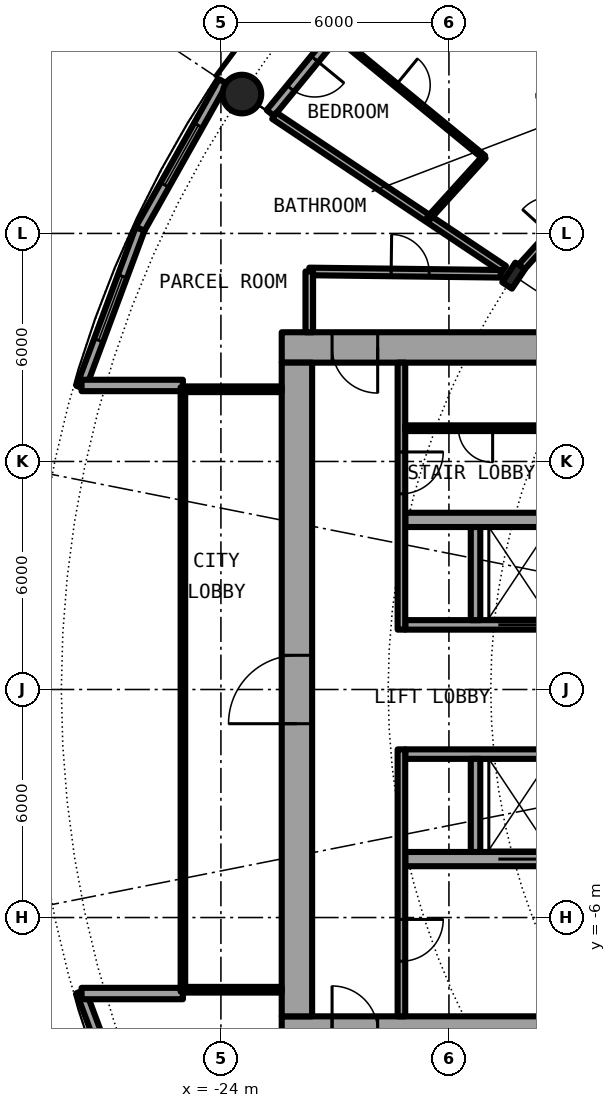
"""IFC4 building model, lengths in metres.
Left out: names, types, materials, properties, quantities, classifications, styles, units other than length and angle.
Written with IfcOpenShell. Run it as: python <this file> out.ifc"""

import sys

from ifc_helpers import new_model, si_unit, direction, frame, frame_2d, origin, origin_2d, place, context, subcontext, project, spatial, rectangle, hollow_circle, i_section, extrude, element, fill, save


model = new_model("IFC4")
c1 = context("Model", 3, precision=1e-05, world=origin(), true_north=direction((0.0, 1.0)))
c2 = subcontext(c1, "Body", "Model", "MODEL_VIEW")
j1 = project(units=[si_unit("LENGTHUNIT", "METRE"), si_unit("PLANEANGLEUNIT", "RADIAN")], contexts=[c1])
p1 = place(None, origin())
s1 = spatial("IfcSite", under=j1, at=p1, CompositionType="ELEMENT")
p2 = place(p1, origin())
s2 = spatial("IfcBuilding", under=s1, at=p2, CompositionType="ELEMENT")
p3 = place(p2, frame((0.0, 0.0, 28.9)))
s3 = spatial("IfcBuildingStorey", under=s2, at=p3, CompositionType="ELEMENT", Elevation=28.9)
p4 = place(p3, frame((-23.448, 15.667, 0.0), z_axis=(0.0, 0.0, 1.0), x_axis=(1.0, 0.0, 0.0)))
e1 = element("IfcColumn", 1, at=p4, inside=s3, PredefinedType="COLUMN", context=c2, shape_type="SweptSolid", body=[
    extrude(hollow_circle(Radius=0.508, WallThickness=0.05, at=origin_2d()), origin(), (0.0, 0.0, 1.0), 3.05),
])
p5 = place(p3, frame((-16.297, 10.889, 0.0), z_axis=(0.0, 0.0, 1.0), x_axis=(-0.831469612303, 0.55557023302, 0.0)))
e2 = element("IfcColumn", 2, at=p5, inside=s3, PredefinedType="COLUMN", context=c2, shape_type="SweptSolid", body=[
    extrude(i_section(OverallWidth=0.305, OverallDepth=0.62, WebThickness=0.021, FlangeThickness=0.04, FilletRadius=0.027, at=origin_2d()), origin(), (0.0, 0.0, 1.0), 3.05),
])
p6 = place(p3, frame((-19.304, 19.304, 0.0), z_axis=(0.0, 0.0, 1.0), x_axis=(-0.634382322723, -0.773019449054, 0.0)))
e3 = element("IfcWall", 3, at=p6, inside=s3, PredefinedType="SOLIDWALL", context=c2, shape_type="SweptSolid", body=[
    extrude(rectangle(XDim=5.352, YDim=0.25, at=frame_2d((2.676, 0.0))), origin(), (0.0, 0.0, 1.0), 2.7),
])
p7 = place(p6, frame((0.441, 0.0, 0.3)))
e4 = element("IfcOpeningElement", 4, at=p7, cuts=e3, PredefinedType="OPENING", context=c2, shape_type="SweptSolid", body=[
    extrude(rectangle(XDim=1.8, YDim=2.1, at=frame_2d((0.9, 1.05))), frame((0.0, 0.135, 0.0), z_axis=(0.0, -1.0, 0.0), x_axis=(1.0, 0.0, 0.0)), (0.0, 0.0, 1.0), 0.27),
])
p8 = place(p6, frame((3.51, 0.0, 0.0)))
e5 = element("IfcOpeningElement", 5, at=p8, cuts=e3, PredefinedType="OPENING", context=c2, shape_type="SweptSolid", body=[
    extrude(rectangle(XDim=1.0, YDim=2.2, at=frame_2d((0.5, 1.1))), frame((0.0, 0.135, 0.0), z_axis=(0.0, -1.0, 0.0), x_axis=(1.0, 0.0, 0.0)), (0.0, 0.0, 1.0), 0.27),
])
p9 = place(p3, frame((-27.682, -7.945, 0.0), z_axis=(0.0, 0.0, 1.0), x_axis=(0.349247811493, -0.937030397675, 0.0)))
e6 = element("IfcWall", 6, at=p9, inside=s3, PredefinedType="SOLIDWALL", context=c2, shape_type="SweptSolid", body=[
    extrude(rectangle(XDim=4.452, YDim=0.25, at=frame_2d((2.226, 0.0))), origin(), (0.0, 0.0, 1.0), 2.7),
])
p10 = place(p9, frame((1.327, 0.0, 0.3)))
e7 = element("IfcOpeningElement", 7, at=p10, cuts=e6, PredefinedType="OPENING", context=c2, shape_type="SweptSolid", body=[
    extrude(rectangle(XDim=1.8, YDim=2.1, at=frame_2d((0.9, 1.05))), frame((0.0, 0.135, 0.0), z_axis=(0.0, -1.0, 0.0), x_axis=(1.0, 0.0, 0.0)), (0.0, 0.0, 1.0), 0.27),
])
p11 = place(p3, frame((-23.946, 16.0, 0.0), z_axis=(0.0, 0.0, 1.0), x_axis=(-0.489696356642, -0.871893042919, 0.0)))
e8 = element("IfcWall", 8, at=p11, inside=s3, PredefinedType="SOLIDWALL", context=c2, shape_type="SweptSolid", body=[
    extrude(rectangle(XDim=4.454, YDim=0.25, at=frame_2d((2.227, 0.0))), origin(), (0.0, 0.0, 1.0), 2.7),
])
p12 = place(p11, frame((1.327, 0.0, 0.3)))
e9 = element("IfcOpeningElement", 9, at=p12, cuts=e8, PredefinedType="OPENING", context=c2, shape_type="SweptSolid", body=[
    extrude(rectangle(XDim=1.8, YDim=2.1, at=frame_2d((0.9, 1.05))), frame((0.0, 0.135, 0.0), z_axis=(0.0, -1.0, 0.0), x_axis=(1.0, 0.0, 0.0)), (0.0, 0.0, 1.0), 0.27),
])
p13 = place(p3, frame((-26.127, 12.117, 0.0), z_axis=(0.0, 0.0, 1.0), x_axis=(-0.349247811493, -0.937030397675, 0.0)))
e10 = element("IfcWall", 10, at=p13, inside=s3, PredefinedType="SOLIDWALL", context=c2, shape_type="SweptSolid", body=[
    extrude(rectangle(XDim=4.452, YDim=0.25, at=frame_2d((2.226, 0.0))), origin(), (0.0, 0.0, 1.0), 2.7),
])
p14 = place(p13, frame((1.327, 0.0, 0.3)))
e11 = element("IfcOpeningElement", 11, at=p14, cuts=e10, PredefinedType="OPENING", context=c2, shape_type="SweptSolid", body=[
    extrude(rectangle(XDim=1.8, YDim=2.1, at=frame_2d((0.9, 1.05))), frame((0.0, 0.135, 0.0), z_axis=(0.0, -1.0, 0.0), x_axis=(1.0, 0.0, 0.0)), (0.0, 0.0, 1.0), 0.27),
])
for number, where, z_axis, x_axis in (
    (12, (-25.0, 8.0, 0.0), (0.0, 0.0, 1.0), (-1.0, 0.0, 0.0)),
    (13, (-25.0, -8.0, 0.0), (0.0, 0.0, 1.0), (-1.0, 0.0, 0.0)),
):
    element("IfcWall", number, at=place(p3, frame(where, z_axis=z_axis, x_axis=x_axis)), inside=s3, PredefinedType="SOLIDWALL", context=c2, shape_type="SweptSolid", body=[
        extrude(rectangle(XDim=2.667, YDim=0.3, at=frame_2d((1.333, 0.0))), origin(), (0.0, 0.0, 1.0), 2.7),
    ])
p15 = place(p3, frame((-22.4, -9.0, 0.0), z_axis=(0.0, 0.0, 1.0), x_axis=(1.0, 0.0, 0.0)))
e14 = element("IfcWall", 14, at=p15, inside=s3, PredefinedType="SHEAR", context=c2, shape_type="SweptSolid", body=[
    extrude(rectangle(XDim=14.2, YDim=0.8, at=frame_2d((7.1, 0.0))), origin(), (0.0, 0.0, 1.0), 3.05),
])
p16 = place(p15, frame((1.325, 0.0, 0.0)))
e15 = element("IfcOpeningElement", 15, at=p16, cuts=e14, PredefinedType="OPENING", context=c2, shape_type="SweptSolid", body=[
    extrude(rectangle(XDim=1.2, YDim=2.3, at=frame_2d((0.6, 1.15))), frame((0.0, 0.41, 0.0), z_axis=(0.0, -1.0, 0.0), x_axis=(1.0, 0.0, 0.0)), (0.0, 0.0, 1.0), 0.82),
])
p17 = place(p3, frame((-8.2, 9.0, 0.0), z_axis=(0.0, 0.0, 1.0), x_axis=(-1.0, 0.0, 0.0)))
e16 = element("IfcWall", 16, at=p17, inside=s3, PredefinedType="SHEAR", context=c2, shape_type="SweptSolid", body=[
    extrude(rectangle(XDim=14.2, YDim=0.8, at=frame_2d((7.1, 0.0))), origin(), (0.0, 0.0, 1.0), 3.05),
])
p18 = place(p17, frame((11.675, 0.0, 0.0)))
e17 = element("IfcOpeningElement", 17, at=p18, cuts=e16, PredefinedType="OPENING", context=c2, shape_type="SweptSolid", body=[
    extrude(rectangle(XDim=1.2, YDim=2.3, at=frame_2d((0.6, 1.15))), frame((0.0, 0.41, 0.0), z_axis=(0.0, -1.0, 0.0), x_axis=(1.0, 0.0, 0.0)), (0.0, 0.0, 1.0), 0.82),
])
p19 = place(p3, frame((-22.0, -8.6, 0.0), z_axis=(0.0, 0.0, 1.0), x_axis=(0.0, 1.0, 0.0)))
e18 = element("IfcWall", 18, at=p19, inside=s3, PredefinedType="SHEAR", context=c2, shape_type="SweptSolid", body=[
    extrude(rectangle(XDim=17.2, YDim=0.8, at=frame_2d((8.6, 0.0))), origin(), (0.0, 0.0, 1.0), 3.05),
])
p20 = place(p19, frame((7.7, 0.0, 0.0)))
e19 = element("IfcOpeningElement", 19, at=p20, cuts=e18, PredefinedType="OPENING", context=c2, shape_type="SweptSolid", body=[
    extrude(rectangle(XDim=1.8, YDim=2.3, at=frame_2d((0.9, 1.15))), frame((0.0, 0.41, 0.0), z_axis=(0.0, -1.0, 0.0), x_axis=(1.0, 0.0, 0.0)), (0.0, 0.0, 1.0), 0.82),
])
p21 = place(p3, frame((-9.0, -1.7, 0.0), z_axis=(0.0, 0.0, 1.0), x_axis=(-1.0, 0.0, 0.0)))
e20 = element("IfcWall", 20, at=p21, inside=s3, PredefinedType="SHEAR", context=c2, shape_type="SweptSolid", body=[
    extrude(rectangle(XDim=10.15, YDim=0.25, at=frame_2d((5.075, 0.0))), origin(), (0.0, 0.0, 1.0), 3.05),
])
p22 = place(p21, frame((0.387, 0.0, 0.0)))
e21 = element("IfcOpeningElement", 21, at=p22, cuts=e20, PredefinedType="OPENING", context=c2, shape_type="SweptSolid", body=[
    extrude(rectangle(XDim=1.1, YDim=2.3, at=frame_2d((0.55, 1.15))), frame((0.0, 0.135, 0.0), z_axis=(0.0, -1.0, 0.0), x_axis=(1.0, 0.0, 0.0)), (0.0, 0.0, 1.0), 0.27),
])
p23 = place(p21, frame((2.45, 0.0, 0.0)))
e22 = element("IfcOpeningElement", 22, at=p23, cuts=e20, PredefinedType="OPENING", context=c2, shape_type="SweptSolid", body=[
    extrude(rectangle(XDim=1.1, YDim=2.3, at=frame_2d((0.55, 1.15))), frame((0.0, 0.135, 0.0), z_axis=(0.0, -1.0, 0.0), x_axis=(1.0, 0.0, 0.0)), (0.0, 0.0, 1.0), 0.27),
])
p24 = place(p21, frame((4.45, 0.0, 0.0)))
e23 = element("IfcOpeningElement", 23, at=p24, cuts=e20, PredefinedType="OPENING", context=c2, shape_type="SweptSolid", body=[
    extrude(rectangle(XDim=1.1, YDim=2.3, at=frame_2d((0.55, 1.15))), frame((0.0, 0.135, 0.0), z_axis=(0.0, -1.0, 0.0), x_axis=(1.0, 0.0, 0.0)), (0.0, 0.0, 1.0), 0.27),
])
p25 = place(p3, frame((-9.0, -4.462, 0.0), z_axis=(0.0, 0.0, 1.0), x_axis=(-1.0, 0.0, 0.0)))
e24 = element("IfcWall", 24, at=p25, inside=s3, PredefinedType="SHEAR", context=c2, shape_type="SweptSolid", body=[
    extrude(rectangle(XDim=10.15, YDim=0.375, at=frame_2d((5.075, 0.0))), origin(), (0.0, 0.0, 1.0), 3.05),
])
p26 = place(p25, frame((6.6, 0.0, 0.0)))
e25 = element("IfcOpeningElement", 25, at=p26, cuts=e24, PredefinedType="OPENING", context=c2, shape_type="SweptSolid", body=[
    extrude(rectangle(XDim=1.1, YDim=2.3, at=frame_2d((0.55, 1.15))), frame((0.0, 0.198, 0.0), z_axis=(0.0, -1.0, 0.0), x_axis=(1.0, 0.0, 0.0)), (0.0, 0.0, 1.0), 0.395),
])
p27 = place(p3, frame((-17.3, -1.825, 0.0), z_axis=(0.0, 0.0, 1.0), x_axis=(0.0, -1.0, 0.0)))
e26 = element("IfcWall", 26, at=p27, inside=s3, PredefinedType="SOLIDWALL", context=c2, shape_type="SweptSolid", body=[
    extrude(rectangle(XDim=2.45, YDim=0.25, at=frame_2d((1.225, 0.0))), origin(), (0.0, 0.0, 1.0), 2.7),
])
p28 = place(p3, frame((-19.25, -1.575, 0.0), z_axis=(0.0, 0.0, 1.0), x_axis=(0.0, -1.0, 0.0)))
e27 = element("IfcWall", 27, at=p28, inside=s3, PredefinedType="SOLIDWALL", context=c2, shape_type="SweptSolid", body=[
    extrude(rectangle(XDim=7.025, YDim=0.2, at=frame_2d((3.513, 0.0))), origin(), (0.0, 0.0, 1.0), 2.7),
])
p29 = place(p28, frame((4.475, 0.0, 0.0)))
e28 = element("IfcOpeningElement", 28, at=p29, cuts=e27, PredefinedType="OPENING", context=c2, shape_type="SweptSolid", body=[
    extrude(rectangle(XDim=1.1, YDim=2.3, at=frame_2d((0.55, 1.15))), frame((0.0, 0.11, 0.0), z_axis=(0.0, -1.0, 0.0), x_axis=(1.0, 0.0, 0.0)), (0.0, 0.0, 1.0), 0.22),
])
p30 = place(p3, frame((-19.15, 1.7, 0.0), z_axis=(0.0, 0.0, 1.0), x_axis=(1.0, 0.0, 0.0)))
e29 = element("IfcWall", 29, at=p30, inside=s3, PredefinedType="SHEAR", context=c2, shape_type="SweptSolid", body=[
    extrude(rectangle(XDim=10.15, YDim=0.25, at=frame_2d((5.075, 0.0))), origin(), (0.0, 0.0, 1.0), 3.05),
])
p31 = place(p30, frame((2.45, 0.0, 0.0)))
e30 = element("IfcOpeningElement", 30, at=p31, cuts=e29, PredefinedType="OPENING", context=c2, shape_type="SweptSolid", body=[
    extrude(rectangle(XDim=1.1, YDim=2.3, at=frame_2d((0.55, 1.15))), frame((0.0, 0.135, 0.0), z_axis=(0.0, -1.0, 0.0), x_axis=(1.0, 0.0, 0.0)), (0.0, 0.0, 1.0), 0.27),
])
p32 = place(p30, frame((8.087, 0.0, 0.0)))
e31 = element("IfcOpeningElement", 31, at=p32, cuts=e29, PredefinedType="OPENING", context=c2, shape_type="SweptSolid", body=[
    extrude(rectangle(XDim=0.9, YDim=2.3, at=frame_2d((0.45, 1.15))), frame((0.0, 0.135, 0.0), z_axis=(0.0, -1.0, 0.0), x_axis=(1.0, 0.0, 0.0)), (0.0, 0.0, 1.0), 0.27),
])
p33 = place(p30, frame((5.075, 0.0, 0.0)))
e32 = element("IfcOpeningElement", 32, at=p33, cuts=e29, PredefinedType="OPENING", context=c2, shape_type="SweptSolid", body=[
    extrude(rectangle(XDim=0.9, YDim=2.3, at=frame_2d((0.45, 1.15))), frame((0.0, 0.135, 0.0), z_axis=(0.0, -1.0, 0.0), x_axis=(1.0, 0.0, 0.0)), (0.0, 0.0, 1.0), 0.27),
])
p34 = place(p3, frame((-9.0, 4.462, 0.0), z_axis=(0.0, 0.0, 1.0), x_axis=(-1.0, 0.0, 0.0)))
e33 = element("IfcWall", 33, at=p34, inside=s3, PredefinedType="SHEAR", context=c2, shape_type="SweptSolid", body=[
    extrude(rectangle(XDim=10.15, YDim=0.375, at=frame_2d((5.075, 0.0))), origin(), (0.0, 0.0, 1.0), 3.05),
])
p35 = place(p3, frame((-17.3, 1.825, 0.0), z_axis=(0.0, 0.0, 1.0), x_axis=(0.0, 1.0, 0.0)))
e34 = element("IfcWall", 34, at=p35, inside=s3, PredefinedType="SOLIDWALL", context=c2, shape_type="SweptSolid", body=[
    extrude(rectangle(XDim=2.45, YDim=0.25, at=frame_2d((1.225, 0.0))), origin(), (0.0, 0.0, 1.0), 2.7),
])
p36 = place(p3, frame((-19.25, 8.6, 0.0), z_axis=(0.0, 0.0, 1.0), x_axis=(0.0, -1.0, 0.0)))
e35 = element("IfcWall", 35, at=p36, inside=s3, PredefinedType="SOLIDWALL", context=c2, shape_type="SweptSolid", body=[
    extrude(rectangle(XDim=7.025, YDim=0.2, at=frame_2d((3.513, 0.0))), origin(), (0.0, 0.0, 1.0), 2.7),
])
p37 = place(p36, frame((2.35, 0.0, 0.0)))
e36 = element("IfcOpeningElement", 36, at=p37, cuts=e35, PredefinedType="OPENING", context=c2, shape_type="SweptSolid", body=[
    extrude(rectangle(XDim=1.1, YDim=2.3, at=frame_2d((0.55, 1.15))), frame((0.0, 0.11, 0.0), z_axis=(0.0, -1.0, 0.0), x_axis=(1.0, 0.0, 0.0)), (0.0, 0.0, 1.0), 0.22),
])
p38 = place(p3, frame((-15.45, 6.875, 0.0), z_axis=(0.0, 0.0, 1.0), x_axis=(-1.0, 0.0, 0.0)))
e37 = element("IfcWall", 37, at=p38, inside=s3, PredefinedType="PARTITIONING", context=c2, shape_type="SweptSolid", body=[
    extrude(rectangle(XDim=3.7, YDim=0.15, at=frame_2d((1.85, 0.0))), origin(), (0.0, 0.0, 1.0), 2.7),
])
p39 = place(p38, frame((1.4, 0.0, 0.0)))
e38 = element("IfcOpeningElement", 38, at=p39, cuts=e37, PredefinedType="OPENING", context=c2, shape_type="SweptSolid", body=[
    extrude(rectangle(XDim=0.9, YDim=2.3, at=frame_2d((0.45, 1.15))), frame((0.0, 0.085, 0.0), z_axis=(0.0, -1.0, 0.0), x_axis=(1.0, 0.0, 0.0)), (0.0, 0.0, 1.0), 0.17),
])
for number, where, z_axis, x_axis in (
    (39, (-22.4, 7.9, 0.0), (0.0, 0.0, 1.0), (-1.0, 0.0, 0.0)),
    (40, (-22.4, -7.9, 0.0), (0.0, 0.0, 1.0), (-1.0, 0.0, 0.0)),
):
    element("IfcWall", number, at=place(p3, frame(where, z_axis=z_axis, x_axis=x_axis)), inside=s3, PredefinedType="PARTITIONING", context=c2, shape_type="SweptSolid", body=[
        extrude(rectangle(XDim=2.54, YDim=0.15, at=frame_2d((1.27, 0.0))), origin(), (0.0, 0.0, 1.0), 2.7),
    ])
p40 = place(p3, frame((-25.0, 7.95, 0.0), z_axis=(0.0, 0.0, 1.0), x_axis=(0.0, -1.0, 0.0)))
e41 = element("IfcWall", 41, at=p40, inside=s3, PredefinedType="PARTITIONING", context=c2, shape_type="SweptSolid", body=[
    extrude(rectangle(XDim=15.9, YDim=0.12, at=frame_2d((7.95, 0.0))), origin(), (0.0, 0.0, 1.0), 2.7),
])
p41 = place(p40, frame((0.95, 0.0, 0.1)))
e42 = element("IfcOpeningElement", 42, at=p41, cuts=e41, PredefinedType="OPENING", context=c2, shape_type="SweptSolid", body=[
    extrude(rectangle(XDim=14.0, YDim=2.35, at=frame_2d((7.0, 1.175))), frame((0.0, 0.07, 0.0), z_axis=(0.0, -1.0, 0.0), x_axis=(1.0, 0.0, 0.0)), (0.0, 0.0, 1.0), 0.14),
])
p42 = place(p3, frame((-22.595, 15.097, 0.0), z_axis=(0.0, 0.0, 1.0), x_axis=(0.831465568067, -0.555576285599, 0.0)))
e43 = element("IfcWall", 43, at=p42, inside=s3, PredefinedType="PARTITIONING", context=c2, shape_type="SweptSolid", body=[
    extrude(rectangle(XDim=7.264, YDim=0.2, at=frame_2d((3.632, 0.0))), origin(), (0.0, 0.0, 1.0), 2.7),
])
p43 = place(p3, frame((-21.012, 17.233, 0.0), z_axis=(0.0, 0.0, 1.0), x_axis=(0.77326214499, -0.634086472908, 0.0)))
e44 = element("IfcWall", 44, at=p43, inside=s3, PredefinedType="PARTITIONING", context=c2, shape_type="SweptSolid", body=[
    extrude(rectangle(XDim=5.089, YDim=0.1, at=frame_2d((2.544, 0.0))), origin(), (0.0, 0.0, 1.0), 2.7),
])
p44 = place(p43, frame((2.094, 0.0, 0.0)))
e45 = element("IfcOpeningElement", 45, at=p44, cuts=e44, PredefinedType="OPENING", context=c2, shape_type="SweptSolid", body=[
    extrude(rectangle(XDim=0.9, YDim=2.3, at=frame_2d((0.45, 1.15))), frame((0.0, 0.06, 0.0), z_axis=(0.0, -1.0, 0.0), x_axis=(1.0, 0.0, 0.0)), (0.0, 0.0, 1.0), 0.12),
])
p45 = place(p3, frame((-17.24, 21.007, 0.0), z_axis=(0.0, 0.0, 1.0), x_axis=(0.634381303318, -0.773020285633, 0.0)))
e46 = element("IfcWall", 46, at=p45, inside=s3, PredefinedType="PARTITIONING", context=c2, shape_type="SweptSolid", body=[
    extrude(rectangle(XDim=7.576, YDim=0.2, at=frame_2d((3.788, 0.0))), origin(), (0.0, 0.0, 1.0), 2.7),
])
p46 = place(p3, frame((-21.675, 11.0, 0.0), z_axis=(0.0, 0.0, 1.0), x_axis=(0.99992425795, -0.012307654658, 0.0)))
e47 = element("IfcWall", 47, at=p46, inside=s3, PredefinedType="PARTITIONING", context=c2, shape_type="SweptSolid", body=[
    extrude(rectangle(XDim=5.039, YDim=0.2, at=frame_2d((2.519, 0.0))), origin(), (0.0, 0.0, 1.0), 2.7),
])
p47 = place(p46, frame((2.155, 0.0, 0.0)))
e48 = element("IfcOpeningElement", 48, at=p47, cuts=e47, PredefinedType="OPENING", context=c2, shape_type="SweptSolid", body=[
    extrude(rectangle(XDim=1.0, YDim=2.3, at=frame_2d((0.5, 1.15))), frame((0.0, 0.11, 0.0), z_axis=(0.0, -1.0, 0.0), x_axis=(1.0, 0.0, 0.0)), (0.0, 0.0, 1.0), 0.22),
])
p48 = place(p3, frame((-16.193, 11.003, 0.0), z_axis=(0.0, 0.0, 1.0), x_axis=(0.671514934772, 0.740991020444, 0.0)))
e49 = element("IfcWall", 49, at=p48, inside=s3, PredefinedType="PARTITIONING", context=c2, shape_type="SweptSolid", body=[
    extrude(rectangle(XDim=5.598, YDim=0.2, at=frame_2d((2.799, 0.0))), origin(), (0.0, 0.0, 1.0), 2.38),
])
p49 = place(p48, frame((1.293, 0.0, 0.0)))
e50 = element("IfcOpeningElement", 50, at=p49, cuts=e49, PredefinedType="OPENING", context=c2, shape_type="SweptSolid", body=[
    extrude(rectangle(XDim=1.0, YDim=2.3, at=frame_2d((0.5, 1.15))), frame((0.0, 0.11, 0.0), z_axis=(0.0, -1.0, 0.0), x_axis=(1.0, 0.0, 0.0)), (0.0, 0.0, 1.0), 0.22),
])
p50 = place(p3, frame((-21.675, 9.4, 0.0), z_axis=(0.0, 0.0, 1.0), x_axis=(0.0, 1.0, 0.0)))
e51 = element("IfcWall", 51, at=p50, inside=s3, PredefinedType="PARTITIONING", context=c2, shape_type="SweptSolid", body=[
    extrude(rectangle(XDim=1.6, YDim=0.2, at=frame_2d((0.8, 0.0))), origin(), (0.0, 0.0, 1.0), 2.7),
])
p51 = place(p3, frame((-18.538, 12.394, 0.0), z_axis=(0.0, 0.0, 1.0), x_axis=(0.67169789574, 0.740825172937, 0.0)))
e52 = element("IfcWall", 52, at=p51, inside=s3, PredefinedType="PARTITIONING", context=c2, shape_type="SweptSolid", body=[
    extrude(rectangle(XDim=2.183, YDim=0.1, at=frame_2d((1.091, 0.0))), origin(), (0.0, 0.0, 1.0), 2.7),
])
p52 = place(p8, origin())
e53 = element("IfcDoor", 53, at=p52, inside=s3, OperationType="SINGLE_SWING_LEFT", PredefinedType="DOOR", context=c2, shape_type="SweptSolid", body=[
    extrude(rectangle(XDim=1.0, YDim=2.2, at=frame_2d((0.5, 1.1))), frame((0.0, 0.025, 0.0), z_axis=(0.0, -1.0, 0.0), x_axis=(1.0, 0.0, 0.0)), (0.0, 0.0, 1.0), 0.05),
])
fill(e5, e53)
p53 = place(p12, origin())
e54 = element("IfcWindow", 54, at=p53, inside=s3, PartitioningType="SINGLE_PANEL", PredefinedType="WINDOW", context=c2, shape_type="SweptSolid", body=[
    extrude(rectangle(XDim=1.8, YDim=2.1, at=frame_2d((0.9, 1.05))), frame((0.0, 0.03, 0.0), z_axis=(0.0, -1.0, 0.0), x_axis=(1.0, 0.0, 0.0)), (0.0, 0.0, 1.0), 0.06),
])
fill(e9, e54)
p54 = place(p14, origin())
e55 = element("IfcWindow", 55, at=p54, inside=s3, PartitioningType="SINGLE_PANEL", PredefinedType="WINDOW", context=c2, shape_type="SweptSolid", body=[
    extrude(rectangle(XDim=1.8, YDim=2.1, at=frame_2d((0.9, 1.05))), frame((0.0, 0.03, 0.0), z_axis=(0.0, -1.0, 0.0), x_axis=(1.0, 0.0, 0.0)), (0.0, 0.0, 1.0), 0.06),
])
fill(e11, e55)
p55 = place(p26, origin())
e56 = element("IfcDoor", 56, at=p55, inside=s3, OperationType="DOUBLE_DOOR_SLIDING", PredefinedType="DOOR", context=c2, shape_type="SweptSolid", body=[
    extrude(rectangle(XDim=1.1, YDim=2.3, at=frame_2d((0.55, 1.15))), frame((0.0, 0.025, 0.0), z_axis=(0.0, -1.0, 0.0), x_axis=(1.0, 0.0, 0.0)), (0.0, 0.0, 1.0), 0.05),
])
fill(e25, e56)
p56 = place(p31, origin())
e57 = element("IfcDoor", 57, at=p56, inside=s3, OperationType="DOUBLE_DOOR_SLIDING", PredefinedType="DOOR", context=c2, shape_type="SweptSolid", body=[
    extrude(rectangle(XDim=1.1, YDim=2.3, at=frame_2d((0.55, 1.15))), frame((0.0, 0.025, 0.0), z_axis=(0.0, -1.0, 0.0), x_axis=(1.0, 0.0, 0.0)), (0.0, 0.0, 1.0), 0.05),
])
fill(e30, e57)
p57 = place(p39, origin())
e58 = element("IfcDoor", 58, at=p57, inside=s3, OperationType="SINGLE_SWING_LEFT", PredefinedType="DOOR", context=c2, shape_type="SweptSolid", body=[
    extrude(rectangle(XDim=0.9, YDim=2.3, at=frame_2d((0.45, 1.15))), frame((0.0, 0.025, 0.0), z_axis=(0.0, -1.0, 0.0), x_axis=(1.0, 0.0, 0.0)), (0.0, 0.0, 1.0), 0.05),
])
fill(e38, e58)
p58 = place(p29, origin())
e59 = element("IfcDoor", 59, at=p58, inside=s3, OperationType="SINGLE_SWING_LEFT", PredefinedType="DOOR", context=c2, shape_type="SweptSolid", body=[
    extrude(rectangle(XDim=1.1, YDim=2.3, at=frame_2d((0.55, 1.15))), frame((0.0, 0.025, 0.0), z_axis=(0.0, -1.0, 0.0), x_axis=(1.0, 0.0, 0.0)), (0.0, 0.0, 1.0), 0.05),
])
fill(e28, e59)
p59 = place(p37, origin())
e60 = element("IfcDoor", 60, at=p59, inside=s3, OperationType="SINGLE_SWING_RIGHT", PredefinedType="DOOR", context=c2, shape_type="SweptSolid", body=[
    extrude(rectangle(XDim=1.1, YDim=2.3, at=frame_2d((0.55, 1.15))), frame((0.0, 0.025, 0.0), z_axis=(0.0, -1.0, 0.0), x_axis=(1.0, 0.0, 0.0)), (0.0, 0.0, 1.0), 0.05),
])
fill(e36, e60)
p60 = place(p18, origin())
e61 = element("IfcDoor", 61, at=p60, inside=s3, OperationType="SINGLE_SWING_LEFT", PredefinedType="DOOR", context=c2, shape_type="SweptSolid", body=[
    extrude(rectangle(XDim=1.2, YDim=2.3, at=frame_2d((0.6, 1.15))), frame((0.0, 0.025, 0.0), z_axis=(0.0, -1.0, 0.0), x_axis=(1.0, 0.0, 0.0)), (0.0, 0.0, 1.0), 0.05),
])
fill(e17, e61)
p61 = place(p20, origin())
e62 = element("IfcDoor", 62, at=p61, inside=s3, OperationType="SINGLE_SWING_LEFT", PredefinedType="DOOR", context=c2, shape_type="SweptSolid", body=[
    extrude(rectangle(XDim=1.8, YDim=2.3, at=frame_2d((0.9, 1.15))), frame((0.0, 0.025, 0.0), z_axis=(0.0, -1.0, 0.0), x_axis=(1.0, 0.0, 0.0)), (0.0, 0.0, 1.0), 0.05),
])
fill(e19, e62)
p62 = place(p41, origin())
e63 = element("IfcWindow", 63, at=p62, inside=s3, PartitioningType="SINGLE_PANEL", PredefinedType="WINDOW", context=c2, shape_type="SweptSolid", body=[
    extrude(rectangle(XDim=14.0, YDim=2.35, at=frame_2d((7.0, 1.175))), frame((0.0, 0.03, 0.0), z_axis=(0.0, -1.0, 0.0), x_axis=(1.0, 0.0, 0.0)), (0.0, 0.0, 1.0), 0.06),
])
fill(e42, e63)
p63 = place(p44, origin())
e64 = element("IfcDoor", 64, at=p63, inside=s3, OperationType="SINGLE_SWING_RIGHT", PredefinedType="DOOR", context=c2, shape_type="SweptSolid", body=[
    extrude(rectangle(XDim=0.9, YDim=2.3, at=frame_2d((0.45, 1.15))), frame((0.0, 0.025, 0.0), z_axis=(0.0, -1.0, 0.0), x_axis=(1.0, 0.0, 0.0)), (0.0, 0.0, 1.0), 0.05),
])
fill(e45, e64)
p64 = place(p47, origin())
e65 = element("IfcDoor", 65, at=p64, inside=s3, OperationType="SINGLE_SWING_RIGHT", PredefinedType="DOOR", context=c2, shape_type="SweptSolid", body=[
    extrude(rectangle(XDim=1.0, YDim=2.3, at=frame_2d((0.5, 1.15))), frame((0.0, 0.025, 0.0), z_axis=(0.0, -1.0, 0.0), x_axis=(1.0, 0.0, 0.0)), (0.0, 0.0, 1.0), 0.05),
])
fill(e48, e65)
save(model, sys.argv[1])
